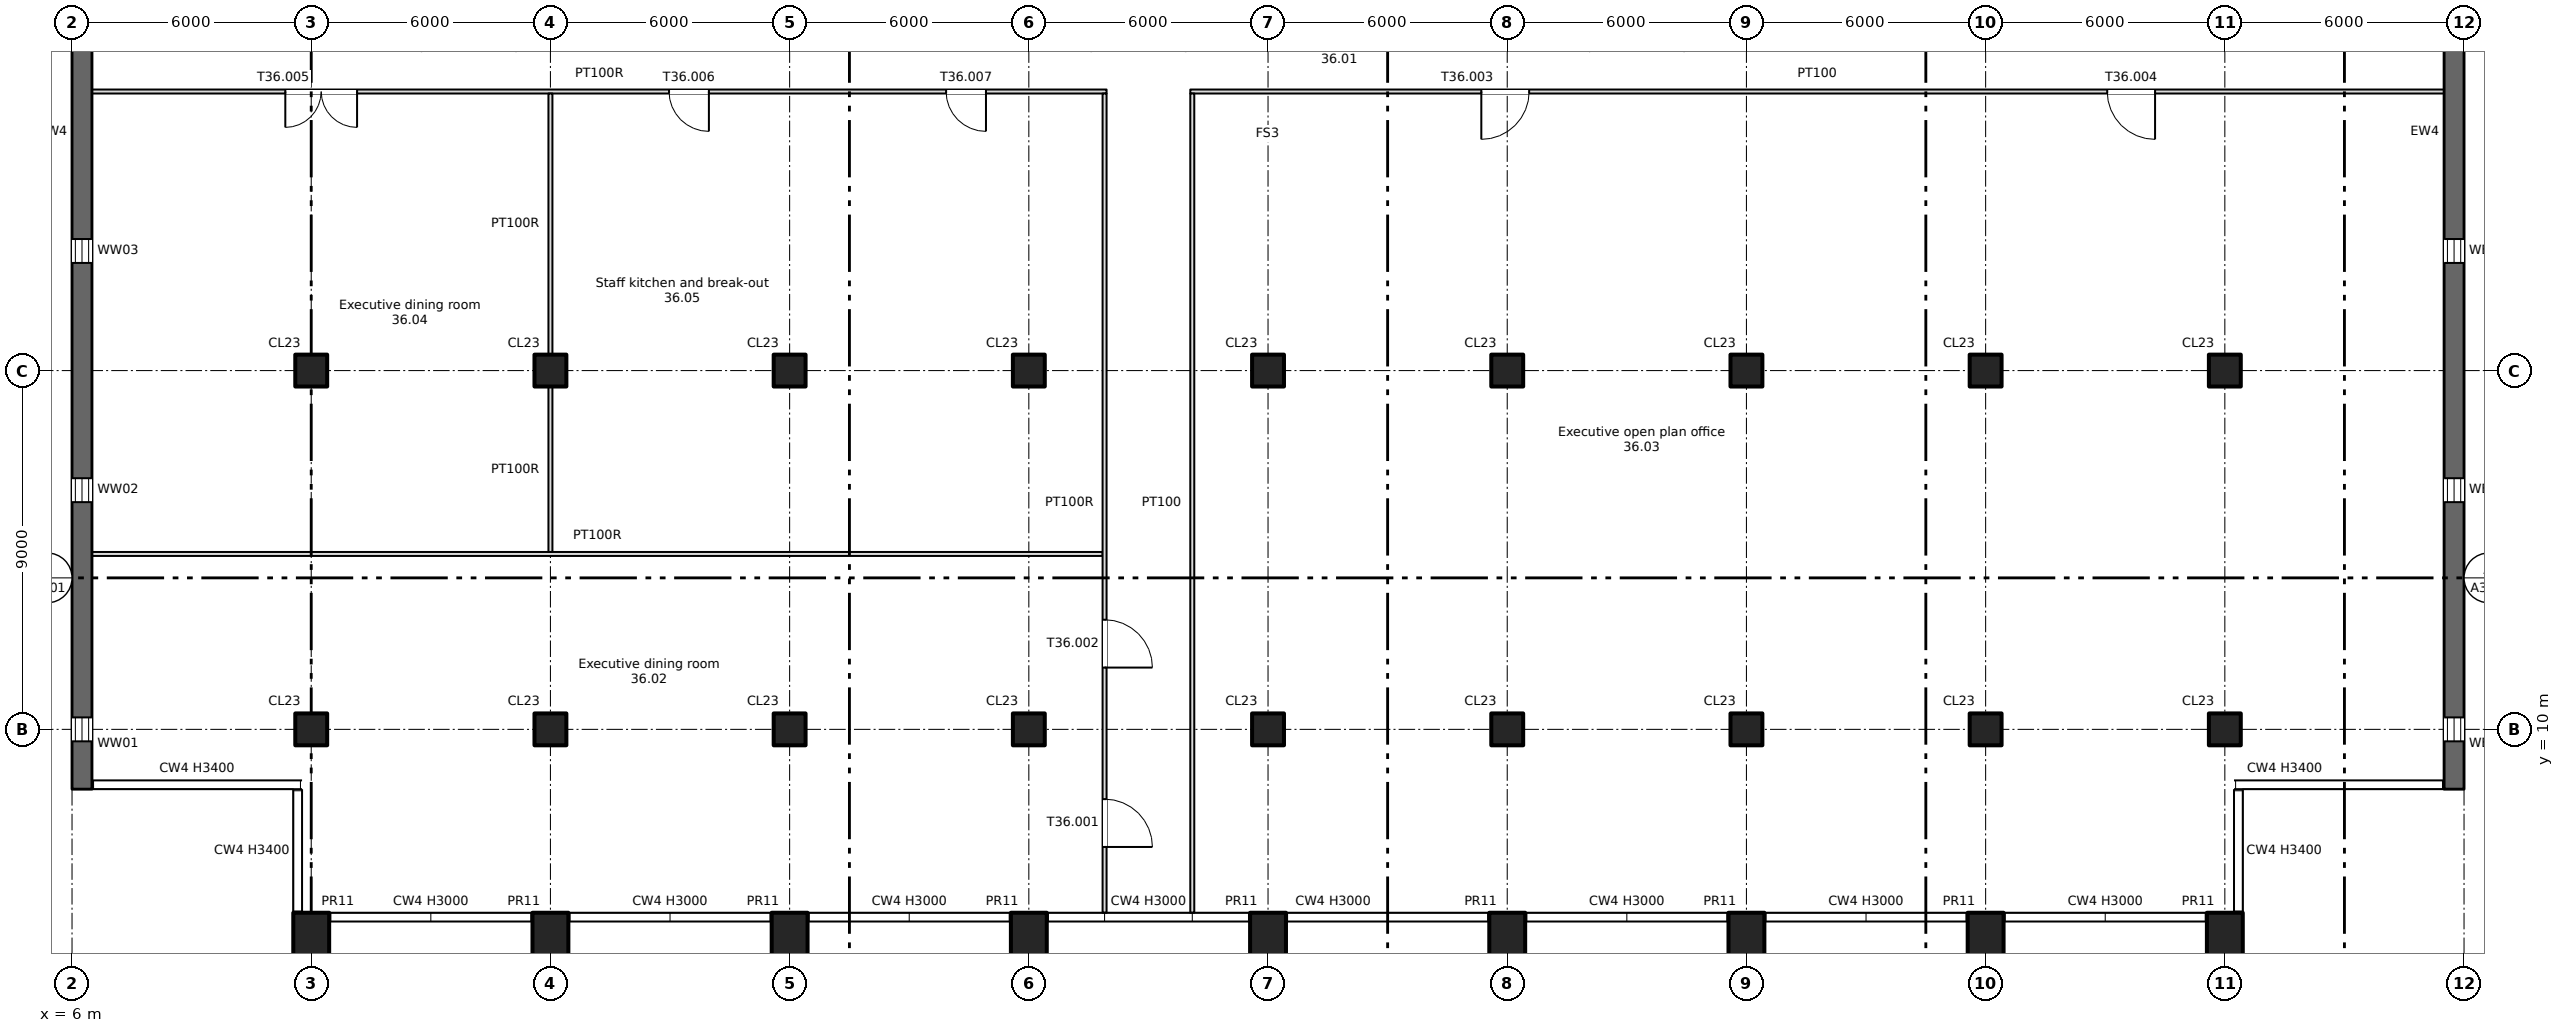
"""IFC4 building model, lengths in metres.
Left out: names, types, materials, properties, quantities, classifications, styles, units other than length and angle.
Written with IfcOpenShell. Run it as: python <this file> out.ifc"""

import sys

from ifc_helpers import new_model, si_unit, direction, frame, frame_2d, origin, origin_2d, place, context, subcontext, project, spatial, rectangle, extrude, element, fill, save


model = new_model("IFC4")
c1 = context("Model", 3, precision=1e-05, world=origin(), true_north=direction((0.0, 1.0)))
c2 = subcontext(c1, "Body", "Model", "MODEL_VIEW")
j1 = project(units=[si_unit("LENGTHUNIT", "METRE"), si_unit("PLANEANGLEUNIT", "RADIAN")], contexts=[c1])
p1 = place(None, origin())
s1 = spatial("IfcSite", under=j1, at=p1, CompositionType="ELEMENT")
p2 = place(p1, origin())
s2 = spatial("IfcBuilding", under=s1, at=p2, CompositionType="ELEMENT")
p3 = place(p2, frame((0.0, 0.0, 254.55)))
s3 = spatial("IfcBuildingStorey", under=s2, at=p3, CompositionType="ELEMENT", Elevation=254.55)
for number, where, z_axis, x_axis in (
    (1, (12.0, 4.7, -0.4), (0.0, 0.0, 1.0), (1.0, 0.0, 0.0)),
    (2, (18.0, 4.7, -0.4), (0.0, 0.0, 1.0), (1.0, 0.0, 0.0)),
    (3, (24.0, 4.7, -0.4), (0.0, 0.0, 1.0), (1.0, 0.0, 0.0)),
    (4, (30.0, 4.7, -0.4), (0.0, 0.0, 1.0), (1.0, 0.0, 0.0)),
    (5, (36.0, 4.7, -0.4), (0.0, 0.0, 1.0), (1.0, 0.0, 0.0)),
    (6, (42.0, 4.7, -0.4), (0.0, 0.0, 1.0), (1.0, 0.0, 0.0)),
    (7, (48.0, 4.7, -0.4), (0.0, 0.0, 1.0), (1.0, 0.0, 0.0)),
    (8, (54.0, 4.7, -0.4), (0.0, 0.0, 1.0), (1.0, 0.0, 0.0)),
    (9, (60.0, 4.7, -0.4), (0.0, 0.0, 1.0), (1.0, 0.0, 0.0)),
):
    element("IfcColumn", number, at=place(p3, frame(where, z_axis=z_axis, x_axis=x_axis)), inside=s3, PredefinedType="COLUMN", context=c2, shape_type="SweptSolid", body=[
        extrude(rectangle(XDim=0.9, YDim=1.4, at=origin_2d()), origin(), (0.0, 0.0, 1.0), 3.8),
    ])
for number, where, z_axis, x_axis in (
    (10, (12.0, 10.0, 0.0), (0.0, 0.0, 1.0), (1.0, 0.0, 0.0)),
    (11, (12.0, 19.0, 0.0), (0.0, 0.0, 1.0), (1.0, 0.0, 0.0)),
    (12, (18.0, 10.0, 0.0), (0.0, 0.0, 1.0), (1.0, 0.0, 0.0)),
    (13, (18.0, 19.0, 0.0), (0.0, 0.0, 1.0), (1.0, 0.0, 0.0)),
    (14, (24.0, 10.0, 0.0), (0.0, 0.0, 1.0), (1.0, 0.0, 0.0)),
    (15, (24.0, 19.0, 0.0), (0.0, 0.0, 1.0), (1.0, 0.0, 0.0)),
    (16, (30.0, 10.0, 0.0), (0.0, 0.0, 1.0), (1.0, 0.0, 0.0)),
    (17, (30.0, 19.0, 0.0), (0.0, 0.0, 1.0), (1.0, 0.0, 0.0)),
    (18, (36.0, 10.0, 0.0), (0.0, 0.0, 1.0), (1.0, 0.0, 0.0)),
    (19, (36.0, 19.0, 0.0), (0.0, 0.0, 1.0), (1.0, 0.0, 0.0)),
    (20, (42.0, 10.0, 0.0), (0.0, 0.0, 1.0), (1.0, 0.0, 0.0)),
    (21, (42.0, 19.0, 0.0), (0.0, 0.0, 1.0), (1.0, 0.0, 0.0)),
    (22, (48.0, 10.0, 0.0), (0.0, 0.0, 1.0), (1.0, 0.0, 0.0)),
    (23, (48.0, 19.0, 0.0), (0.0, 0.0, 1.0), (1.0, 0.0, 0.0)),
    (24, (54.0, 10.0, 0.0), (0.0, 0.0, 1.0), (1.0, 0.0, 0.0)),
    (25, (54.0, 19.0, 0.0), (0.0, 0.0, 1.0), (1.0, 0.0, 0.0)),
    (26, (60.0, 10.0, 0.0), (0.0, 0.0, 1.0), (1.0, 0.0, 0.0)),
    (27, (60.0, 19.0, 0.0), (0.0, 0.0, 1.0), (1.0, 0.0, 0.0)),
):
    element("IfcColumn", number, at=place(p3, frame(where, z_axis=z_axis, x_axis=x_axis)), inside=s3, PredefinedType="COLUMN", context=c2, shape_type="SweptSolid", body=[
        extrude(rectangle(XDim=0.8, YDim=0.8, at=origin_2d()), origin(), (0.0, 0.0, 1.0), 3.4),
    ])
p4 = place(p3, frame((6.25, 8.5, 0.0), z_axis=(0.0, 0.0, 1.0), x_axis=(0.0, 1.0, 0.0)))
e28 = element("IfcWall", 28, at=p4, inside=s3, PredefinedType="SHEAR", context=c2, shape_type="SweptSolid", body=[
    extrude(rectangle(XDim=33.0, YDim=0.5, at=frame_2d((16.5, 0.0))), origin(), (0.0, 0.0, 1.0), 3.4),
])
p5 = place(p4, frame((1.2, 0.0, 0.6)))
e29 = element("IfcOpeningElement", 29, at=p5, cuts=e28, PredefinedType="OPENING", context=c2, shape_type="SweptSolid", body=[
    extrude(rectangle(XDim=0.6, YDim=2.4, at=frame_2d((0.3, 1.2))), frame((0.0, 0.26, 0.0), z_axis=(0.0, -1.0, 0.0), x_axis=(1.0, 0.0, 0.0)), (0.0, 0.0, 1.0), 0.52),
])
p6 = place(p4, frame((7.2, 0.0, 0.6)))
e30 = element("IfcOpeningElement", 30, at=p6, cuts=e28, PredefinedType="OPENING", context=c2, shape_type="SweptSolid", body=[
    extrude(rectangle(XDim=0.6, YDim=2.4, at=frame_2d((0.3, 1.2))), frame((0.0, 0.26, 0.0), z_axis=(0.0, -1.0, 0.0), x_axis=(1.0, 0.0, 0.0)), (0.0, 0.0, 1.0), 0.52),
])
p7 = place(p4, frame((13.2, 0.0, 0.6)))
e31 = element("IfcOpeningElement", 31, at=p7, cuts=e28, PredefinedType="OPENING", context=c2, shape_type="SweptSolid", body=[
    extrude(rectangle(XDim=0.6, YDim=2.4, at=frame_2d((0.3, 1.2))), frame((0.0, 0.26, 0.0), z_axis=(0.0, -1.0, 0.0), x_axis=(1.0, 0.0, 0.0)), (0.0, 0.0, 1.0), 0.52),
])
p8 = place(p3, frame((65.75, 8.5, 0.0), z_axis=(0.0, 0.0, 1.0), x_axis=(0.0, 1.0, 0.0)))
e32 = element("IfcWall", 32, at=p8, inside=s3, PredefinedType="SHEAR", context=c2, shape_type="SweptSolid", body=[
    extrude(rectangle(XDim=33.0, YDim=0.5, at=frame_2d((16.5, 0.0))), origin(), (0.0, 0.0, 1.0), 3.4),
])
p9 = place(p8, frame((1.2, 0.0, 0.6)))
e33 = element("IfcOpeningElement", 33, at=p9, cuts=e32, PredefinedType="OPENING", context=c2, shape_type="SweptSolid", body=[
    extrude(rectangle(XDim=0.6, YDim=2.4, at=frame_2d((0.3, 1.2))), frame((0.0, 0.26, 0.0), z_axis=(0.0, -1.0, 0.0), x_axis=(1.0, 0.0, 0.0)), (0.0, 0.0, 1.0), 0.52),
])
p10 = place(p8, frame((7.2, 0.0, 0.6)))
e34 = element("IfcOpeningElement", 34, at=p10, cuts=e32, PredefinedType="OPENING", context=c2, shape_type="SweptSolid", body=[
    extrude(rectangle(XDim=0.6, YDim=2.4, at=frame_2d((0.3, 1.2))), frame((0.0, 0.26, 0.0), z_axis=(0.0, -1.0, 0.0), x_axis=(1.0, 0.0, 0.0)), (0.0, 0.0, 1.0), 0.52),
])
p11 = place(p8, frame((13.2, 0.0, 0.6)))
e35 = element("IfcOpeningElement", 35, at=p11, cuts=e32, PredefinedType="OPENING", context=c2, shape_type="SweptSolid", body=[
    extrude(rectangle(XDim=0.6, YDim=2.4, at=frame_2d((0.3, 1.2))), frame((0.0, 0.26, 0.0), z_axis=(0.0, -1.0, 0.0), x_axis=(1.0, 0.0, 0.0)), (0.0, 0.0, 1.0), 0.52),
])
p12 = place(p3, frame((6.5, 14.4, 0.0), z_axis=(0.0, 0.0, 1.0), x_axis=(1.0, 0.0, 0.0)))
e36 = element("IfcWall", 36, at=p12, inside=s3, PredefinedType="PARTITIONING", context=c2, shape_type="SweptSolid", body=[
    extrude(rectangle(XDim=25.35, YDim=0.1, at=frame_2d((12.675, 0.0))), origin(), (0.0, 0.0, 1.0), 3.4),
])
p13 = place(p3, frame((6.5, 26.0, 0.0), z_axis=(0.0, 0.0, 1.0), x_axis=(1.0, 0.0, 0.0)))
e37 = element("IfcWall", 37, at=p13, inside=s3, PredefinedType="PARTITIONING", context=c2, shape_type="SweptSolid", body=[
    extrude(rectangle(XDim=25.45, YDim=0.1, at=frame_2d((12.725, 0.0))), origin(), (0.0, 0.0, 1.0), 3.4),
])
p14 = place(p13, frame((4.85, 0.0, 0.0)))
e38 = element("IfcOpeningElement", 38, at=p14, cuts=e37, PredefinedType="OPENING", context=c2, shape_type="SweptSolid", body=[
    extrude(rectangle(XDim=1.8, YDim=2.1, at=frame_2d((0.9, 1.05))), frame((0.0, 0.06, 0.0), z_axis=(0.0, -1.0, 0.0), x_axis=(1.0, 0.0, 0.0)), (0.0, 0.0, 1.0), 0.12),
])
p15 = place(p13, frame((14.475, 0.0, 0.0)))
e39 = element("IfcOpeningElement", 39, at=p15, cuts=e37, PredefinedType="OPENING", context=c2, shape_type="SweptSolid", body=[
    extrude(rectangle(XDim=1.0, YDim=2.1, at=frame_2d((0.5, 1.05))), frame((0.0, 0.06, 0.0), z_axis=(0.0, -1.0, 0.0), x_axis=(1.0, 0.0, 0.0)), (0.0, 0.0, 1.0), 0.12),
])
p16 = place(p13, frame((21.425, 0.0, 0.0)))
e40 = element("IfcOpeningElement", 40, at=p16, cuts=e37, PredefinedType="OPENING", context=c2, shape_type="SweptSolid", body=[
    extrude(rectangle(XDim=1.0, YDim=2.1, at=frame_2d((0.5, 1.05))), frame((0.0, 0.06, 0.0), z_axis=(0.0, -1.0, 0.0), x_axis=(1.0, 0.0, 0.0)), (0.0, 0.0, 1.0), 0.12),
])
p17 = place(p3, frame((34.05, 26.0, 0.0), z_axis=(0.0, 0.0, 1.0), x_axis=(1.0, 0.0, 0.0)))
e41 = element("IfcWall", 41, at=p17, inside=s3, PredefinedType="PARTITIONING", context=c2, shape_type="SweptSolid", body=[
    extrude(rectangle(XDim=31.45, YDim=0.1, at=frame_2d((15.725, 0.0))), origin(), (0.0, 0.0, 1.0), 3.4),
])
p18 = place(p17, frame((7.3, 0.0, 0.0)))
e42 = element("IfcOpeningElement", 42, at=p18, cuts=e41, PredefinedType="OPENING", context=c2, shape_type="SweptSolid", body=[
    extrude(rectangle(XDim=1.2, YDim=2.1, at=frame_2d((0.6, 1.05))), frame((0.0, 0.06, 0.0), z_axis=(0.0, -1.0, 0.0), x_axis=(1.0, 0.0, 0.0)), (0.0, 0.0, 1.0), 0.12),
])
p19 = place(p17, frame((23.0, 0.0, 0.0)))
e43 = element("IfcOpeningElement", 43, at=p19, cuts=e41, PredefinedType="OPENING", context=c2, shape_type="SweptSolid", body=[
    extrude(rectangle(XDim=1.2, YDim=2.1, at=frame_2d((0.6, 1.05))), frame((0.0, 0.06, 0.0), z_axis=(0.0, -1.0, 0.0), x_axis=(1.0, 0.0, 0.0)), (0.0, 0.0, 1.0), 0.12),
])
p20 = place(p3, frame((18.0, 14.45, 0.0), z_axis=(0.0, 0.0, 1.0), x_axis=(0.0, 1.0, 0.0)))
e44 = element("IfcWall", 44, at=p20, inside=s3, PredefinedType="PARTITIONING", context=c2, shape_type="SweptSolid", body=[
    extrude(rectangle(XDim=4.15, YDim=0.1, at=frame_2d((2.075, 0.0))), origin(), (0.0, 0.0, 1.0), 3.4),
])
p21 = place(p3, frame((18.0, 19.4, 0.0), z_axis=(0.0, 0.0, 1.0), x_axis=(0.0, 1.0, 0.0)))
e45 = element("IfcWall", 45, at=p21, inside=s3, PredefinedType="PARTITIONING", context=c2, shape_type="SweptSolid", body=[
    extrude(rectangle(XDim=6.55, YDim=0.1, at=frame_2d((3.275, 0.0))), origin(), (0.0, 0.0, 1.0), 3.4),
])
p22 = place(p3, frame((31.9, 5.4, 0.0), z_axis=(0.0, 0.0, 1.0), x_axis=(0.0, 1.0, 0.0)))
e46 = element("IfcWall", 46, at=p22, inside=s3, PredefinedType="PARTITIONING", context=c2, shape_type="SweptSolid", body=[
    extrude(rectangle(XDim=20.55, YDim=0.1, at=frame_2d((10.275, 0.0))), origin(), (0.0, 0.0, 1.0), 3.4),
])
p23 = place(p22, frame((1.65, 0.0, 0.0)))
e47 = element("IfcOpeningElement", 47, at=p23, cuts=e46, PredefinedType="OPENING", context=c2, shape_type="SweptSolid", body=[
    extrude(rectangle(XDim=1.2, YDim=2.1, at=frame_2d((0.6, 1.05))), frame((0.0, 0.06, 0.0), z_axis=(0.0, -1.0, 0.0), x_axis=(1.0, 0.0, 0.0)), (0.0, 0.0, 1.0), 0.12),
])
p24 = place(p22, frame((6.15, 0.0, 0.0)))
e48 = element("IfcOpeningElement", 48, at=p24, cuts=e46, PredefinedType="OPENING", context=c2, shape_type="SweptSolid", body=[
    extrude(rectangle(XDim=1.2, YDim=2.1, at=frame_2d((0.6, 1.05))), frame((0.0, 0.06, 0.0), z_axis=(0.0, -1.0, 0.0), x_axis=(1.0, 0.0, 0.0)), (0.0, 0.0, 1.0), 0.12),
])
p25 = place(p3, frame((34.1, 5.4, 0.0), z_axis=(0.0, 0.0, 1.0), x_axis=(0.0, 1.0, 0.0)))
e49 = element("IfcWall", 49, at=p25, inside=s3, PredefinedType="PARTITIONING", context=c2, shape_type="SweptSolid", body=[
    extrude(rectangle(XDim=20.55, YDim=0.1, at=frame_2d((10.275, 0.0))), origin(), (0.0, 0.0, 1.0), 3.4),
])
p26 = place(p5, origin())
e50 = element("IfcWindow", 50, at=p26, inside=s3, PartitioningType="SINGLE_PANEL", PredefinedType="WINDOW", context=c2, shape_type="SweptSolid", body=[
    extrude(rectangle(XDim=0.6, YDim=2.4, at=frame_2d((0.3, 1.2))), frame((0.0, 0.03, 0.0), z_axis=(0.0, -1.0, 0.0), x_axis=(1.0, 0.0, 0.0)), (0.0, 0.0, 1.0), 0.06),
])
fill(e29, e50)
p27 = place(p6, origin())
e51 = element("IfcWindow", 51, at=p27, inside=s3, PartitioningType="SINGLE_PANEL", PredefinedType="WINDOW", context=c2, shape_type="SweptSolid", body=[
    extrude(rectangle(XDim=0.6, YDim=2.4, at=frame_2d((0.3, 1.2))), frame((0.0, 0.03, 0.0), z_axis=(0.0, -1.0, 0.0), x_axis=(1.0, 0.0, 0.0)), (0.0, 0.0, 1.0), 0.06),
])
fill(e30, e51)
p28 = place(p7, origin())
e52 = element("IfcWindow", 52, at=p28, inside=s3, PartitioningType="SINGLE_PANEL", PredefinedType="WINDOW", context=c2, shape_type="SweptSolid", body=[
    extrude(rectangle(XDim=0.6, YDim=2.4, at=frame_2d((0.3, 1.2))), frame((0.0, 0.03, 0.0), z_axis=(0.0, -1.0, 0.0), x_axis=(1.0, 0.0, 0.0)), (0.0, 0.0, 1.0), 0.06),
])
fill(e31, e52)
p29 = place(p9, origin())
e53 = element("IfcWindow", 53, at=p29, inside=s3, PartitioningType="SINGLE_PANEL", PredefinedType="WINDOW", context=c2, shape_type="SweptSolid", body=[
    extrude(rectangle(XDim=0.6, YDim=2.4, at=frame_2d((0.3, 1.2))), frame((0.0, 0.03, 0.0), z_axis=(0.0, -1.0, 0.0), x_axis=(1.0, 0.0, 0.0)), (0.0, 0.0, 1.0), 0.06),
])
fill(e33, e53)
p30 = place(p10, origin())
e54 = element("IfcWindow", 54, at=p30, inside=s3, PartitioningType="SINGLE_PANEL", PredefinedType="WINDOW", context=c2, shape_type="SweptSolid", body=[
    extrude(rectangle(XDim=0.6, YDim=2.4, at=frame_2d((0.3, 1.2))), frame((0.0, 0.03, 0.0), z_axis=(0.0, -1.0, 0.0), x_axis=(1.0, 0.0, 0.0)), (0.0, 0.0, 1.0), 0.06),
])
fill(e34, e54)
p31 = place(p11, origin())
e55 = element("IfcWindow", 55, at=p31, inside=s3, PartitioningType="SINGLE_PANEL", PredefinedType="WINDOW", context=c2, shape_type="SweptSolid", body=[
    extrude(rectangle(XDim=0.6, YDim=2.4, at=frame_2d((0.3, 1.2))), frame((0.0, 0.03, 0.0), z_axis=(0.0, -1.0, 0.0), x_axis=(1.0, 0.0, 0.0)), (0.0, 0.0, 1.0), 0.06),
])
fill(e35, e55)
p32 = place(p23, origin())
e56 = element("IfcDoor", 56, at=p32, inside=s3, OperationType="SINGLE_SWING_LEFT", PredefinedType="DOOR", context=c2, shape_type="SweptSolid", body=[
    extrude(rectangle(XDim=1.2, YDim=2.1, at=frame_2d((0.6, 1.05))), frame((0.0, 0.025, 0.0), z_axis=(0.0, -1.0, 0.0), x_axis=(1.0, 0.0, 0.0)), (0.0, 0.0, 1.0), 0.05),
])
fill(e47, e56)
p33 = place(p24, origin())
e57 = element("IfcDoor", 57, at=p33, inside=s3, OperationType="SINGLE_SWING_LEFT", PredefinedType="DOOR", context=c2, shape_type="SweptSolid", body=[
    extrude(rectangle(XDim=1.2, YDim=2.1, at=frame_2d((0.6, 1.05))), frame((0.0, 0.025, 0.0), z_axis=(0.0, -1.0, 0.0), x_axis=(1.0, 0.0, 0.0)), (0.0, 0.0, 1.0), 0.05),
])
fill(e48, e57)
p34 = place(p18, origin())
e58 = element("IfcDoor", 58, at=p34, inside=s3, OperationType="SINGLE_SWING_LEFT", PredefinedType="DOOR", context=c2, shape_type="SweptSolid", body=[
    extrude(rectangle(XDim=1.2, YDim=2.1, at=frame_2d((0.6, 1.05))), frame((0.0, 0.025, 0.0), z_axis=(0.0, -1.0, 0.0), x_axis=(1.0, 0.0, 0.0)), (0.0, 0.0, 1.0), 0.05),
])
fill(e42, e58)
p35 = place(p19, origin())
e59 = element("IfcDoor", 59, at=p35, inside=s3, OperationType="SINGLE_SWING_RIGHT", PredefinedType="DOOR", context=c2, shape_type="SweptSolid", body=[
    extrude(rectangle(XDim=1.2, YDim=2.1, at=frame_2d((0.6, 1.05))), frame((0.0, 0.025, 0.0), z_axis=(0.0, -1.0, 0.0), x_axis=(1.0, 0.0, 0.0)), (0.0, 0.0, 1.0), 0.05),
])
fill(e43, e59)
p36 = place(p14, origin())
e60 = element("IfcDoor", 60, at=p36, inside=s3, OperationType="DOUBLE_DOOR_SINGLE_SWING", PredefinedType="DOOR", context=c2, shape_type="SweptSolid", body=[
    extrude(rectangle(XDim=1.8, YDim=2.1, at=frame_2d((0.9, 1.05))), frame((0.0, 0.025, 0.0), z_axis=(0.0, -1.0, 0.0), x_axis=(1.0, 0.0, 0.0)), (0.0, 0.0, 1.0), 0.05),
])
fill(e38, e60)
p37 = place(p15, origin())
e61 = element("IfcDoor", 61, at=p37, inside=s3, OperationType="SINGLE_SWING_RIGHT", PredefinedType="DOOR", context=c2, shape_type="SweptSolid", body=[
    extrude(rectangle(XDim=1.0, YDim=2.1, at=frame_2d((0.5, 1.05))), frame((0.0, 0.025, 0.0), z_axis=(0.0, -1.0, 0.0), x_axis=(1.0, 0.0, 0.0)), (0.0, 0.0, 1.0), 0.05),
])
fill(e39, e61)
p38 = place(p16, origin())
e62 = element("IfcDoor", 62, at=p38, inside=s3, OperationType="SINGLE_SWING_RIGHT", PredefinedType="DOOR", context=c2, shape_type="SweptSolid", body=[
    extrude(rectangle(XDim=1.0, YDim=2.1, at=frame_2d((0.5, 1.05))), frame((0.0, 0.025, 0.0), z_axis=(0.0, -1.0, 0.0), x_axis=(1.0, 0.0, 0.0)), (0.0, 0.0, 1.0), 0.05),
])
fill(e40, e62)
save(model, sys.argv[1])
